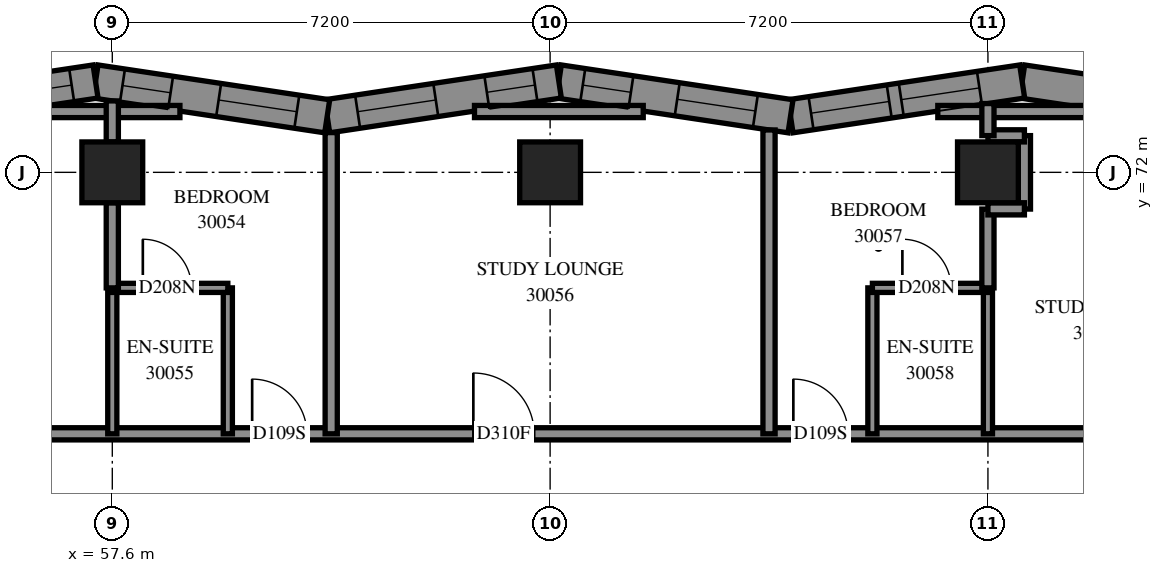
"""IFC4 building model, lengths in metres.
Left out: names, types, materials, properties, quantities, classifications, styles, units other than length and angle.
Written with IfcOpenShell. Run it as: python <this file> out.ifc"""

import sys

from ifc_helpers import new_model, si_unit, direction, frame, frame_2d, origin, origin_2d, place, context, subcontext, project, spatial, polyline, rectangle, outline, extrude, element, fill, save


model = new_model("IFC4")
c1 = context("Model", 3, precision=1e-05, world=origin(), true_north=direction((0.0, 1.0)))
c2 = subcontext(c1, "Body", "Model", "MODEL_VIEW")
j1 = project(units=[si_unit("LENGTHUNIT", "METRE"), si_unit("PLANEANGLEUNIT", "RADIAN")], contexts=[c1])
p1 = place(None, origin())
s1 = spatial("IfcSite", under=j1, at=p1, CompositionType="ELEMENT")
p2 = place(p1, origin())
s2 = spatial("IfcBuilding", under=s1, at=p2, CompositionType="ELEMENT")
p3 = place(p2, frame((0.0, 0.0, 111.8)))
s3 = spatial("IfcBuildingStorey", under=s2, at=p3, CompositionType="ELEMENT", Elevation=111.8)
for number, where, z_axis, x_axis in (
    (1, (57.6, 72.0, 0.0), (0.0, 0.0, 1.0), (1.0, 0.0, 0.0)),
    (2, (64.8, 72.0, 0.0), (0.0, 0.0, 1.0), (1.0, 0.0, 0.0)),
    (3, (72.0, 72.0, 0.0), (0.0, 0.0, 1.0), (1.0, 0.0, 0.0)),
):
    element("IfcColumn", number, at=place(p3, frame(where, z_axis=z_axis, x_axis=x_axis)), inside=s3, PredefinedType="COLUMN", context=c2, shape_type="SweptSolid", body=[
        extrude(rectangle(XDim=1.0, YDim=1.0, at=origin_2d()), origin(), (0.0, 0.0, 1.0), 3.1),
    ])
p4 = place(p3, frame((76.394, 72.919, 0.0), z_axis=(0.0, 0.0, 1.0), x_axis=(-0.9889181677, 0.1484616368, 0.0)))
e4 = element("IfcWall", 4, at=p4, inside=s3, PredefinedType="SOLIDWALL", context=c2, shape_type="SweptSolid", body=[
    extrude(outline(polyline([(0.063, -0.275), (3.915, -0.275), (3.832, 0.275), (-0.063, 0.275), (0.063, -0.275)])), origin(), (0.0, 0.0, 1.0), 3.1),
])
p5 = place(p4, frame((1.118, 0.0, 0.5)))
e5 = element("IfcOpeningElement", 5, at=p5, cuts=e4, PredefinedType="OPENING", context=c2, shape_type="SweptSolid", body=[
    extrude(rectangle(XDim=1.2, YDim=2.45, at=frame_2d((0.6, 1.225))), frame((0.0, 0.285, 0.0), z_axis=(0.0, -1.0, 0.0), x_axis=(1.0, 0.0, 0.0)), (0.0, 0.0, 1.0), 0.57),
])
p6 = place(p3, frame((72.563, 73.494, 0.0), z_axis=(0.0, 0.0, 1.0), x_axis=(-0.9889150173, -0.1484826202, 0.0)))
e6 = element("IfcWall", 6, at=p6, inside=s3, PredefinedType="SOLIDWALL", context=c2, shape_type="SweptSolid", body=[
    extrude(outline(polyline([(-0.041, -0.275), (3.811, -0.275), (3.894, 0.275), (0.041, 0.275), (-0.041, -0.275)])), origin(), (0.0, 0.0, 1.0), 3.1),
])
p7 = place(p6, frame((0.711, 0.0, 0.5)))
e7 = element("IfcOpeningElement", 7, at=p7, cuts=e6, PredefinedType="OPENING", context=c2, shape_type="SweptSolid", body=[
    extrude(rectangle(XDim=1.3, YDim=2.45, at=frame_2d((0.65, 1.225))), frame((0.0, 0.285, 0.0), z_axis=(0.0, -1.0, 0.0), x_axis=(1.0, 0.0, 0.0)), (0.0, 0.0, 1.0), 0.57),
])
p8 = place(p6, frame((2.211, 0.0, 0.5)))
e8 = element("IfcOpeningElement", 8, at=p8, cuts=e6, PredefinedType="OPENING", context=c2, shape_type="SweptSolid", body=[
    extrude(rectangle(XDim=1.3, YDim=2.45, at=frame_2d((0.65, 1.225))), frame((0.0, 0.285, 0.0), z_axis=(0.0, -1.0, 0.0), x_axis=(1.0, 0.0, 0.0)), (0.0, 0.0, 1.0), 0.57),
])
p9 = place(p3, frame((68.754, 72.922, 0.0), z_axis=(0.0, 0.0, 1.0), x_axis=(-0.9889155896, 0.1484788086, 0.0)))
e9 = element("IfcWall", 9, at=p9, inside=s3, PredefinedType="SOLIDWALL", context=c2, shape_type="SweptSolid", body=[
    extrude(outline(polyline([(0.041, -0.275), (3.894, -0.275), (3.811, 0.275), (-0.041, 0.275), (0.041, -0.275)])), origin(), (0.0, 0.0, 1.0), 3.1),
])
p10 = place(p9, frame((0.584, 0.0, 0.5)))
e10 = element("IfcOpeningElement", 10, at=p10, cuts=e9, PredefinedType="OPENING", context=c2, shape_type="SweptSolid", body=[
    extrude(rectangle(XDim=1.3, YDim=2.45, at=frame_2d((0.65, 1.225))), frame((0.0, 0.285, 0.0), z_axis=(0.0, -1.0, 0.0), x_axis=(1.0, 0.0, 0.0)), (0.0, 0.0, 1.0), 0.57),
])
p11 = place(p9, frame((2.655, 0.0, 0.45)))
e11 = element("IfcOpeningElement", 11, at=p11, cuts=e9, PredefinedType="OPENING", context=c2, shape_type="SweptSolid", body=[
    extrude(rectangle(XDim=0.8, YDim=2.5, at=frame_2d((0.4, 1.25))), frame((0.0, 0.285, 0.0), z_axis=(0.0, -1.0, 0.0), x_axis=(1.0, 0.0, 0.0)), (0.0, 0.0, 1.0), 0.57),
])
p12 = place(p3, frame((64.944, 73.494, 0.0), z_axis=(0.0, 0.0, 1.0), x_axis=(-0.9889150173, -0.1484826202, 0.0)))
e12 = element("IfcWall", 12, at=p12, inside=s3, PredefinedType="SOLIDWALL", context=c2, shape_type="SweptSolid", body=[
    extrude(outline(polyline([(-0.041, -0.275), (3.811, -0.275), (3.894, 0.275), (0.041, 0.275), (-0.041, -0.275)])), origin(), (0.0, 0.0, 1.0), 3.1),
])
p13 = place(p12, frame((2.047, 0.0, 0.5)))
e13 = element("IfcOpeningElement", 13, at=p13, cuts=e12, PredefinedType="OPENING", context=c2, shape_type="SweptSolid", body=[
    extrude(rectangle(XDim=1.3, YDim=2.45, at=frame_2d((0.65, 1.225))), frame((0.0, 0.285, 0.0), z_axis=(0.0, -1.0, 0.0), x_axis=(1.0, 0.0, 0.0)), (0.0, 0.0, 1.0), 0.57),
])
p14 = place(p12, frame((0.398, 0.0, 0.45)))
e14 = element("IfcOpeningElement", 14, at=p14, cuts=e12, PredefinedType="OPENING", context=c2, shape_type="SweptSolid", body=[
    extrude(rectangle(XDim=0.8, YDim=2.5, at=frame_2d((0.4, 1.25))), frame((0.0, 0.285, 0.0), z_axis=(0.0, -1.0, 0.0), x_axis=(1.0, 0.0, 0.0)), (0.0, 0.0, 1.0), 0.57),
])
p15 = place(p3, frame((61.134, 72.922, 0.0), z_axis=(0.0, 0.0, 1.0), x_axis=(-0.9889155896, 0.1484788086, 0.0)))
e15 = element("IfcWall", 15, at=p15, inside=s3, PredefinedType="SOLIDWALL", context=c2, shape_type="SweptSolid", body=[
    extrude(outline(polyline([(0.041, -0.275), (3.894, -0.275), (3.811, 0.275), (-0.041, 0.275), (0.041, -0.275)])), origin(), (0.0, 0.0, 1.0), 3.1),
])
p16 = place(p15, frame((0.505, 0.0, 0.5)))
e16 = element("IfcOpeningElement", 16, at=p16, cuts=e15, PredefinedType="OPENING", context=c2, shape_type="SweptSolid", body=[
    extrude(rectangle(XDim=1.3, YDim=2.45, at=frame_2d((0.65, 1.225))), frame((0.0, 0.285, 0.0), z_axis=(0.0, -1.0, 0.0), x_axis=(1.0, 0.0, 0.0)), (0.0, 0.0, 1.0), 0.57),
])
p17 = place(p15, frame((2.605, 0.0, 0.45)))
e17 = element("IfcOpeningElement", 17, at=p17, cuts=e15, PredefinedType="OPENING", context=c2, shape_type="SweptSolid", body=[
    extrude(rectangle(XDim=0.8, YDim=2.5, at=frame_2d((0.4, 1.25))), frame((0.0, 0.285, 0.0), z_axis=(0.0, -1.0, 0.0), x_axis=(1.0, 0.0, 0.0)), (0.0, 0.0, 1.0), 0.57),
])
p18 = place(p3, frame((57.325, 73.494, 0.0), z_axis=(0.0, 0.0, 1.0), x_axis=(-0.9889155896, -0.1484788086, 0.0)))
e18 = element("IfcWall", 18, at=p18, inside=s3, PredefinedType="SOLIDWALL", context=c2, shape_type="SweptSolid", body=[
    extrude(outline(polyline([(-0.041, -0.275), (3.811, -0.275), (3.894, 0.275), (0.041, 0.275), (-0.041, -0.275)])), origin(), (0.0, 0.0, 1.0), 3.1),
])
p19 = place(p18, frame((1.902, 0.0, 0.5)))
e19 = element("IfcOpeningElement", 19, at=p19, cuts=e18, PredefinedType="OPENING", context=c2, shape_type="SweptSolid", body=[
    extrude(rectangle(XDim=1.3, YDim=2.45, at=frame_2d((0.65, 1.225))), frame((0.0, 0.285, 0.0), z_axis=(0.0, -1.0, 0.0), x_axis=(1.0, 0.0, 0.0)), (0.0, 0.0, 1.0), 0.57),
])
p20 = place(p18, frame((0.398, 0.0, 0.45)))
e20 = element("IfcOpeningElement", 20, at=p20, cuts=e18, PredefinedType="OPENING", context=c2, shape_type="SweptSolid", body=[
    extrude(rectangle(XDim=0.8, YDim=2.5, at=frame_2d((0.4, 1.25))), frame((0.0, 0.285, 0.0), z_axis=(0.0, -1.0, 0.0), x_axis=(1.0, 0.0, 0.0)), (0.0, 0.0, 1.0), 0.57),
])
p21 = place(p3, frame((54.7, 67.7, 0.0), z_axis=(0.0, 0.0, 1.0), x_axis=(1.0, 0.0, 0.0)))
e21 = element("IfcWall", 21, at=p21, inside=s3, PredefinedType="PARTITIONING", context=c2, shape_type="SweptSolid", body=[
    extrude(rectangle(XDim=20.2, YDim=0.2, at=frame_2d((10.1, 0.0))), origin(), (0.0, 0.0, 1.0), 3.1),
])
p22 = place(p21, frame((5.2, 0.0, 0.0)))
e22 = element("IfcOpeningElement", 22, at=p22, cuts=e21, PredefinedType="OPENING", context=c2, shape_type="SweptSolid", body=[
    extrude(rectangle(XDim=0.9, YDim=2.1, at=frame_2d((0.45, 1.05))), frame((0.0, 0.11, 0.0), z_axis=(0.0, -1.0, 0.0), x_axis=(1.0, 0.0, 0.0)), (0.0, 0.0, 1.0), 0.22),
])
p23 = place(p21, frame((8.838, 0.0, 0.0)))
e23 = element("IfcOpeningElement", 23, at=p23, cuts=e21, PredefinedType="OPENING", context=c2, shape_type="SweptSolid", body=[
    extrude(rectangle(XDim=1.0, YDim=2.1, at=frame_2d((0.5, 1.05))), frame((0.0, 0.11, 0.0), z_axis=(0.0, -1.0, 0.0), x_axis=(1.0, 0.0, 0.0)), (0.0, 0.0, 1.0), 0.22),
])
p24 = place(p21, frame((14.1, 0.0, 0.0)))
e24 = element("IfcOpeningElement", 24, at=p24, cuts=e21, PredefinedType="OPENING", context=c2, shape_type="SweptSolid", body=[
    extrude(rectangle(XDim=0.9, YDim=2.1, at=frame_2d((0.45, 1.05))), frame((0.0, 0.11, 0.0), z_axis=(0.0, -1.0, 0.0), x_axis=(1.0, 0.0, 0.0)), (0.0, 0.0, 1.0), 0.22),
])
p25 = place(p3, frame((68.4, 67.7, 0.0), z_axis=(0.0, 0.0, 1.0), x_axis=(0.0, 1.0, 0.0)))
e25 = element("IfcWall", 25, at=p25, inside=s3, PredefinedType="PARTITIONING", context=c2, shape_type="SweptSolid", body=[
    extrude(rectangle(XDim=4.997, YDim=0.2, at=frame_2d((2.498, 0.0))), origin(), (0.0, 0.0, 1.0), 3.1),
])
p26 = place(p3, frame((61.2, 67.7, 0.0), z_axis=(0.0, 0.0, 1.0), x_axis=(0.0, 1.0, 0.0)))
e26 = element("IfcWall", 26, at=p26, inside=s3, PredefinedType="PARTITIONING", context=c2, shape_type="SweptSolid", body=[
    extrude(rectangle(XDim=4.954, YDim=0.2, at=frame_2d((2.477, 0.0))), origin(), (0.0, 0.0, 1.0), 3.1),
])
for number, where, z_axis, x_axis in (
    (27, (63.556, 73.0, 0.0), (0.0, 0.0, 1.0), (1.0, 0.0, 0.0)),
    (28, (55.937, 73.0, 0.0), (0.0, 0.0, 1.0), (1.0, 0.0, 0.0)),
):
    element("IfcWall", number, at=place(p3, frame(where, z_axis=z_axis, x_axis=x_axis)), inside=s3, PredefinedType="PARTITIONING", context=c2, shape_type="SweptSolid", body=[
        extrude(rectangle(XDim=2.775, YDim=0.2, at=frame_2d((1.387, 0.0))), origin(), (0.0, 0.0, 1.0), 3.1),
    ])
p27 = place(p3, frame((71.176, 73.0, 0.0), z_axis=(0.0, 0.0, 1.0), x_axis=(1.0, 0.0, 0.0)))
e29 = element("IfcWall", 29, at=p27, inside=s3, PredefinedType="PARTITIONING", context=c2, shape_type="SweptSolid", body=[
    extrude(rectangle(XDim=2.775, YDim=0.2, at=frame_2d((1.388, 0.0))), origin(), (0.0, 0.0, 1.0), 3.1),
])
for number, where, z_axis, x_axis in (
    (30, (59.5, 67.7, 0.0), (0.0, 0.0, 1.0), (0.0, 1.0, 0.0)),
    (31, (57.6, 67.7, 0.0), (0.0, 0.0, 1.0), (0.0, 1.0, 0.0)),
    (32, (70.1, 67.7, 0.0), (0.0, 0.0, 1.0), (0.0, 1.0, 0.0)),
    (33, (72.0, 67.7, 0.0), (0.0, 0.0, 1.0), (0.0, 1.0, 0.0)),
):
    element("IfcWall", number, at=place(p3, frame(where, z_axis=z_axis, x_axis=x_axis)), inside=s3, PredefinedType="PARTITIONING", context=c2, shape_type="SweptSolid", body=[
        extrude(rectangle(XDim=2.4, YDim=0.15, at=frame_2d((1.2, 0.0))), origin(), (0.0, 0.0, 1.0), 3.1),
    ])
p28 = place(p3, frame((70.1, 70.1, 0.0), z_axis=(0.0, 0.0, 1.0), x_axis=(1.0, 0.0, 0.0)))
e34 = element("IfcWall", 34, at=p28, inside=s3, PredefinedType="PARTITIONING", context=c2, shape_type="SweptSolid", body=[
    extrude(rectangle(XDim=1.9, YDim=0.15, at=frame_2d((0.95, 0.0))), origin(), (0.0, 0.0, 1.0), 3.1),
])
p29 = place(p28, frame((0.493, 0.0, 0.0)))
e35 = element("IfcOpeningElement", 35, at=p29, cuts=e34, PredefinedType="OPENING", context=c2, shape_type="SweptSolid", body=[
    extrude(rectangle(XDim=0.8, YDim=2.1, at=frame_2d((0.4, 1.05))), frame((0.0, 0.085, 0.0), z_axis=(0.0, -1.0, 0.0), x_axis=(1.0, 0.0, 0.0)), (0.0, 0.0, 1.0), 0.17),
])
p30 = place(p3, frame((57.6, 70.1, 0.0), z_axis=(0.0, 0.0, 1.0), x_axis=(1.0, 0.0, 0.0)))
e36 = element("IfcWall", 36, at=p30, inside=s3, PredefinedType="PARTITIONING", context=c2, shape_type="SweptSolid", body=[
    extrude(rectangle(XDim=1.9, YDim=0.15, at=frame_2d((0.95, 0.0))), origin(), (0.0, 0.0, 1.0), 3.1),
])
p31 = place(p30, frame((0.502, 0.0, 0.0)))
e37 = element("IfcOpeningElement", 37, at=p31, cuts=e36, PredefinedType="OPENING", context=c2, shape_type="SweptSolid", body=[
    extrude(rectangle(XDim=0.8, YDim=2.1, at=frame_2d((0.4, 1.05))), frame((0.0, 0.085, 0.0), z_axis=(0.0, -1.0, 0.0), x_axis=(1.0, 0.0, 0.0)), (0.0, 0.0, 1.0), 0.17),
])
p32 = place(p3, frame((57.6, 70.1, 0.0), z_axis=(0.0, 0.0, 1.0), x_axis=(0.0, 1.0, 0.0)))
e38 = element("IfcWall", 38, at=p32, inside=s3, PredefinedType="PARTITIONING", context=c2, shape_type="SweptSolid", body=[
    extrude(rectangle(XDim=1.4, YDim=0.2, at=frame_2d((0.7, 0.0))), origin(), (0.0, 0.0, 1.0), 3.1),
])
p33 = place(p3, frame((72.0, 70.1, 0.0), z_axis=(0.0, 0.0, 1.0), x_axis=(0.0, 1.0, 0.0)))
e39 = element("IfcWall", 39, at=p33, inside=s3, PredefinedType="PARTITIONING", context=c2, shape_type="SweptSolid", body=[
    extrude(rectangle(XDim=1.296, YDim=0.2, at=frame_2d((0.648, 0.0))), origin(), (0.0, 0.0, 1.0), 3.1),
])
p34 = place(p3, frame((72.6, 71.396, 0.0), z_axis=(0.0, 0.0, 1.0), x_axis=(0.0, 1.0, 0.0)))
e40 = element("IfcWall", 40, at=p34, inside=s3, PredefinedType="PARTITIONING", context=c2, shape_type="SweptSolid", body=[
    extrude(rectangle(XDim=1.208, YDim=0.2, at=frame_2d((0.604, 0.0))), origin(), (0.0, 0.0, 1.0), 3.1),
])
for number, where, z_axis, x_axis in (
    (41, (72.0, 72.6, 0.0), (0.0, 0.0, 1.0), (1.0, 0.0, 0.0)),
    (42, (72.0, 71.4, 0.0), (0.0, 0.0, 1.0), (1.0, 0.0, 0.0)),
):
    element("IfcWall", number, at=place(p3, frame(where, z_axis=z_axis, x_axis=x_axis)), inside=s3, PredefinedType="PARTITIONING", context=c2, shape_type="SweptSolid", body=[
        extrude(rectangle(XDim=0.6, YDim=0.2, at=frame_2d((0.3, 0.0))), origin(), (0.0, 0.0, 1.0), 3.1),
    ])
p35 = place(p3, frame((57.6, 72.5, 0.0), z_axis=(0.0, 0.0, 1.0), x_axis=(0.0, 1.0, 0.0)))
e43 = element("IfcWall", 43, at=p35, inside=s3, PredefinedType="PARTITIONING", context=c2, shape_type="SweptSolid", body=[
    extrude(rectangle(XDim=0.674, YDim=0.2, at=frame_2d((0.337, 0.0))), origin(), (0.0, 0.0, 1.0), 3.1),
])
p36 = place(p3, frame((72.0, 72.604, 0.0), z_axis=(0.0, 0.0, 1.0), x_axis=(0.0, 1.0, 0.0)))
e44 = element("IfcWall", 44, at=p36, inside=s3, PredefinedType="PARTITIONING", context=c2, shape_type="SweptSolid", body=[
    extrude(rectangle(XDim=0.527, YDim=0.2, at=frame_2d((0.264, 0.0))), origin(), (0.0, 0.0, 1.0), 3.1),
])
p37 = place(p7, origin())
e45 = element("IfcWindow", 45, at=p37, inside=s3, PartitioningType="SINGLE_PANEL", PredefinedType="WINDOW", context=c2, shape_type="SweptSolid", body=[
    extrude(rectangle(XDim=1.3, YDim=2.45, at=frame_2d((0.65, 1.225))), frame((0.0, 0.145, 0.0), z_axis=(0.0, -1.0, 0.0), x_axis=(1.0, 0.0, 0.0)), (0.0, 0.0, 1.0), 0.06),
])
fill(e7, e45)
p38 = place(p8, origin())
e46 = element("IfcWindow", 46, at=p38, inside=s3, PartitioningType="SINGLE_PANEL", PredefinedType="WINDOW", context=c2, shape_type="SweptSolid", body=[
    extrude(rectangle(XDim=1.3, YDim=2.45, at=frame_2d((0.65, 1.225))), frame((0.0, 0.155, 0.0), z_axis=(0.0, -1.0, 0.0), x_axis=(1.0, 0.0, 0.0)), (0.0, 0.0, 1.0), 0.06),
])
fill(e8, e46)
p39 = place(p10, origin())
e47 = element("IfcWindow", 47, at=p39, inside=s3, PartitioningType="SINGLE_PANEL", PredefinedType="WINDOW", context=c2, shape_type="SweptSolid", body=[
    extrude(rectangle(XDim=1.3, YDim=2.45, at=frame_2d((0.65, 1.225))), frame((0.0, 0.155, 0.0), z_axis=(0.0, -1.0, 0.0), x_axis=(1.0, 0.0, 0.0)), (0.0, 0.0, 1.0), 0.06),
])
fill(e10, e47)
p40 = place(p13, origin())
e48 = element("IfcWindow", 48, at=p40, inside=s3, PartitioningType="SINGLE_PANEL", PredefinedType="WINDOW", context=c2, shape_type="SweptSolid", body=[
    extrude(rectangle(XDim=1.3, YDim=2.45, at=frame_2d((0.65, 1.225))), frame((0.0, 0.155, 0.0), z_axis=(0.0, -1.0, 0.0), x_axis=(1.0, 0.0, 0.0)), (0.0, 0.0, 1.0), 0.06),
])
fill(e13, e48)
p41 = place(p16, origin())
e49 = element("IfcWindow", 49, at=p41, inside=s3, PartitioningType="SINGLE_PANEL", PredefinedType="WINDOW", context=c2, shape_type="SweptSolid", body=[
    extrude(rectangle(XDim=1.3, YDim=2.45, at=frame_2d((0.65, 1.225))), frame((0.0, 0.155, 0.0), z_axis=(0.0, -1.0, 0.0), x_axis=(1.0, 0.0, 0.0)), (0.0, 0.0, 1.0), 0.06),
])
fill(e16, e49)
p42 = place(p22, origin())
e50 = element("IfcDoor", 50, at=p42, inside=s3, OperationType="SINGLE_SWING_RIGHT", PredefinedType="DOOR", context=c2, shape_type="SweptSolid", body=[
    extrude(rectangle(XDim=0.9, YDim=2.1, at=frame_2d((0.45, 1.05))), frame((0.0, 0.025, 0.0), z_axis=(0.0, -1.0, 0.0), x_axis=(1.0, 0.0, 0.0)), (0.0, 0.0, 1.0), 0.05),
])
fill(e22, e50)
p43 = place(p31, origin())
e51 = element("IfcDoor", 51, at=p43, inside=s3, OperationType="SINGLE_SWING_RIGHT", PredefinedType="DOOR", context=c2, shape_type="SweptSolid", body=[
    extrude(rectangle(XDim=0.8, YDim=2.1, at=frame_2d((0.4, 1.05))), frame((0.0, 0.025, 0.0), z_axis=(0.0, -1.0, 0.0), x_axis=(1.0, 0.0, 0.0)), (0.0, 0.0, 1.0), 0.05),
])
fill(e37, e51)
p44 = place(p23, origin())
e52 = element("IfcDoor", 52, at=p44, inside=s3, OperationType="SINGLE_SWING_LEFT", PredefinedType="DOOR", context=c2, shape_type="SweptSolid", body=[
    extrude(rectangle(XDim=1.0, YDim=2.1, at=frame_2d((0.5, 1.05))), frame((0.0, 0.025, 0.0), z_axis=(0.0, -1.0, 0.0), x_axis=(1.0, 0.0, 0.0)), (0.0, 0.0, 1.0), 0.05),
])
fill(e23, e52)
p45 = place(p24, origin())
e53 = element("IfcDoor", 53, at=p45, inside=s3, OperationType="SINGLE_SWING_LEFT", PredefinedType="DOOR", context=c2, shape_type="SweptSolid", body=[
    extrude(rectangle(XDim=0.9, YDim=2.1, at=frame_2d((0.45, 1.05))), frame((0.0, 0.025, 0.0), z_axis=(0.0, -1.0, 0.0), x_axis=(1.0, 0.0, 0.0)), (0.0, 0.0, 1.0), 0.05),
])
fill(e24, e53)
p46 = place(p29, origin())
e54 = element("IfcDoor", 54, at=p46, inside=s3, OperationType="SINGLE_SWING_RIGHT", PredefinedType="DOOR", context=c2, shape_type="SweptSolid", body=[
    extrude(rectangle(XDim=0.8, YDim=2.1, at=frame_2d((0.4, 1.05))), frame((0.0, 0.025, 0.0), z_axis=(0.0, -1.0, 0.0), x_axis=(1.0, 0.0, 0.0)), (0.0, 0.0, 1.0), 0.05),
])
fill(e35, e54)
p47 = place(p11, origin())
e55 = element("IfcWindow", 55, at=p47, inside=s3, PartitioningType="SINGLE_PANEL", PredefinedType="WINDOW", context=c2, shape_type="SweptSolid", body=[
    extrude(rectangle(XDim=0.8, YDim=2.5, at=frame_2d((0.4, 1.25))), frame((0.0, 0.155, 0.0), z_axis=(0.0, -1.0, 0.0), x_axis=(1.0, 0.0, 0.0)), (0.0, 0.0, 1.0), 0.06),
])
fill(e11, e55)
p48 = place(p14, origin())
e56 = element("IfcWindow", 56, at=p48, inside=s3, PartitioningType="SINGLE_PANEL", PredefinedType="WINDOW", context=c2, shape_type="SweptSolid", body=[
    extrude(rectangle(XDim=0.8, YDim=2.5, at=frame_2d((0.4, 1.25))), frame((0.0, 0.155, 0.0), z_axis=(0.0, -1.0, 0.0), x_axis=(1.0, 0.0, 0.0)), (0.0, 0.0, 1.0), 0.06),
])
fill(e14, e56)
p49 = place(p17, origin())
e57 = element("IfcWindow", 57, at=p49, inside=s3, PartitioningType="SINGLE_PANEL", PredefinedType="WINDOW", context=c2, shape_type="SweptSolid", body=[
    extrude(rectangle(XDim=0.8, YDim=2.5, at=frame_2d((0.4, 1.25))), frame((0.0, 0.155, 0.0), z_axis=(0.0, -1.0, 0.0), x_axis=(1.0, 0.0, 0.0)), (0.0, 0.0, 1.0), 0.06),
])
fill(e17, e57)
p50 = place(p20, origin())
e58 = element("IfcWindow", 58, at=p50, inside=s3, PartitioningType="SINGLE_PANEL", PredefinedType="WINDOW", context=c2, shape_type="SweptSolid", body=[
    extrude(rectangle(XDim=0.8, YDim=2.5, at=frame_2d((0.4, 1.25))), frame((0.0, 0.155, 0.0), z_axis=(0.0, -1.0, 0.0), x_axis=(1.0, 0.0, 0.0)), (0.0, 0.0, 1.0), 0.06),
])
fill(e20, e58)
save(model, sys.argv[1])
